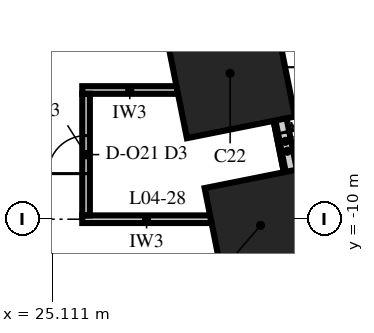
"""IFC4 building model, lengths in metres.
Left out: names, types, materials, properties, quantities, classifications, styles, units other than length and angle.
Written with IfcOpenShell. Run it as: python <this file> out.ifc"""

import sys

from ifc_helpers import new_model, si_unit, direction, frame, frame_2d, origin, origin_2d, place, context, subcontext, project, spatial, rectangle, extrude, element, fill, save


model = new_model("IFC4")
c1 = context("Model", 3, precision=1e-05, world=origin(), true_north=direction((0.0, 1.0)))
c2 = subcontext(c1, "Body", "Model", "MODEL_VIEW")
j1 = project(units=[si_unit("LENGTHUNIT", "METRE"), si_unit("PLANEANGLEUNIT", "RADIAN")], contexts=[c1])
p1 = place(None, origin())
s1 = spatial("IfcSite", under=j1, at=p1, CompositionType="ELEMENT")
p2 = place(p1, origin())
s2 = spatial("IfcBuilding", under=s1, at=p2, CompositionType="ELEMENT")
p3 = place(p2, frame((0.0, 0.0, 28.0)))
s3 = spatial("IfcBuildingStorey", under=s2, at=p3, CompositionType="ELEMENT", Elevation=28.0)
p4 = place(p3, frame((30.591, -10.162, -0.85), z_axis=(0.0, 0.0, 1.0), x_axis=(-0.196116135138, 0.980580675691, 0.0)))
e1 = element("IfcColumn", 1, at=p4, inside=s3, PredefinedType="COLUMN", context=c2, shape_type="SweptSolid", body=[
    extrude(rectangle(XDim=2.5, YDim=2.5, at=origin_2d()), origin(), (0.0, 0.0, 1.0), 4.85),
])
p5 = place(p3, frame((29.791, -6.162, 0.0), z_axis=(0.0, 0.0, 1.0), x_axis=(-0.196116135138, 0.980580675691, 0.0)))
e2 = element("IfcColumn", 2, at=p5, inside=s3, PredefinedType="COLUMN", context=c2, shape_type="SweptSolid", body=[
    extrude(rectangle(XDim=2.9, YDim=2.9, at=origin_2d()), origin(), (0.0, 0.0, 1.0), 4.0),
])
p6 = place(p3, frame((31.601, -9.73, 0.0), z_axis=(0.0, 0.0, 1.0), x_axis=(-0.196167883278, 0.980570324643, 0.0)))
e3 = element("IfcWall", 3, at=p6, inside=s3, PredefinedType="SOLIDWALL", context=c2, shape_type="SweptSolid", body=[
    extrude(rectangle(XDim=3.629, YDim=0.3, at=frame_2d((1.814, 0.0))), origin(), (0.0, 0.0, 1.0), 4.0),
])
p7 = place(p6, frame((1.05, 0.0, 0.0)))
e4 = element("IfcOpeningElement", 4, at=p7, cuts=e3, PredefinedType="OPENING", context=c2, shape_type="SweptSolid", body=[
    extrude(rectangle(XDim=1.0, YDim=2.2, at=frame_2d((0.5, 1.1))), frame((0.0, 0.165, 0.0), z_axis=(0.0, -1.0, 0.0), x_axis=(1.0, 0.0, 0.0)), (0.0, 0.0, 1.0), 0.33),
])
p8 = place(p3, frame((25.9, -10.0, 0.0), z_axis=(0.0, 0.0, 1.0), x_axis=(1.0, 0.0, 0.0)))
e5 = element("IfcWall", 5, at=p8, inside=s3, PredefinedType="PARTITIONING", context=c2, shape_type="SweptSolid", body=[
    extrude(rectangle(XDim=3.384, YDim=0.2, at=frame_2d((1.692, 0.0))), origin(), (0.0, 0.0, 1.0), 3.25),
])
p9 = place(p3, frame((25.9, -6.6, 0.0), z_axis=(0.0, 0.0, 1.0), x_axis=(1.0, 0.0, 0.0)))
e6 = element("IfcWall", 6, at=p9, inside=s3, PredefinedType="PARTITIONING", context=c2, shape_type="SweptSolid", body=[
    extrude(rectangle(XDim=2.5, YDim=0.2, at=frame_2d((1.25, 0.0))), origin(), (0.0, 0.0, 1.0), 3.25),
])
p10 = place(p3, frame((26.0, -9.9, 0.0), z_axis=(0.0, 0.0, 1.0), x_axis=(0.0, 1.0, 0.0)))
e7 = element("IfcWall", 7, at=p10, inside=s3, PredefinedType="PARTITIONING", context=c2, shape_type="SweptSolid", body=[
    extrude(rectangle(XDim=3.2, YDim=0.2, at=frame_2d((1.6, 0.0))), origin(), (0.0, 0.0, 1.0), 3.25),
])
p11 = place(p10, frame((1.1, 0.0, 0.0)))
e8 = element("IfcOpeningElement", 8, at=p11, cuts=e7, PredefinedType="OPENING", context=c2, shape_type="SweptSolid", body=[
    extrude(rectangle(XDim=1.0, YDim=2.1, at=frame_2d((0.5, 1.05))), frame((0.0, 0.115, 0.0), z_axis=(0.0, -1.0, 0.0), x_axis=(1.0, 0.0, 0.0)), (0.0, 0.0, 1.0), 0.23),
])
p12 = place(p7, frame((1.0, 0.0, 0.0), z_axis=(0.0, 0.0, 1.0), x_axis=(-1.0, 0.0, 0.0)))
e9 = element("IfcDoor", 9, at=p12, inside=s3, OperationType="SINGLE_SWING_RIGHT", PredefinedType="DOOR", context=c2, shape_type="SweptSolid", body=[
    extrude(rectangle(XDim=1.0, YDim=2.2, at=frame_2d((0.5, 1.1))), frame((0.0, 0.15, 0.0), z_axis=(0.0, -1.0, 0.0), x_axis=(1.0, 0.0, 0.0)), (0.0, 0.0, 1.0), 0.3),
])
fill(e4, e9)
p13 = place(p11, origin())
e10 = element("IfcDoor", 10, at=p13, inside=s3, OperationType="SINGLE_SWING_RIGHT", PredefinedType="DOOR", context=c2, shape_type="SweptSolid", body=[
    extrude(rectangle(XDim=1.0, YDim=2.1, at=frame_2d((0.5, 1.05))), frame((0.0, 0.1, 0.0), z_axis=(0.0, -1.0, 0.0), x_axis=(1.0, 0.0, 0.0)), (0.0, 0.0, 1.0), 0.199),
])
fill(e8, e10)
save(model, sys.argv[1])
